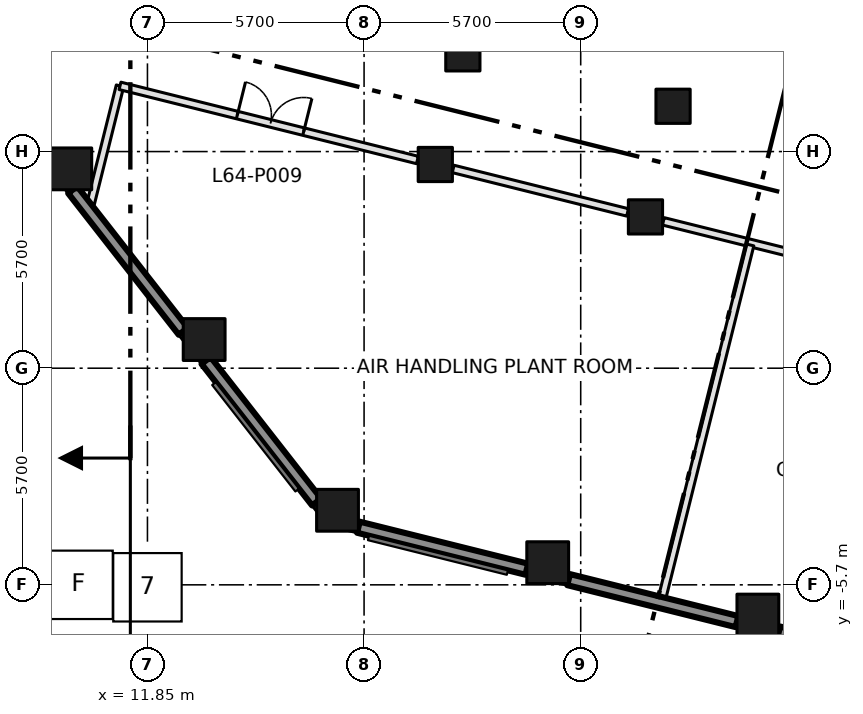
"""IFC4 building model, lengths in metres.
Left out: names, types, materials, properties, quantities, classifications, styles, units other than length and angle.
Written with IfcOpenShell. Run it as: python <this file> out.ifc"""

import sys

from ifc_helpers import new_model, si_unit, direction, frame, frame_2d, origin, origin_2d, place, context, subcontext, project, spatial, rectangle, extrude, element, fill, save


model = new_model("IFC4")
c1 = context("Model", 3, precision=1e-05, world=origin(), true_north=direction((0.0, 1.0)))
c2 = subcontext(c1, "Body", "Model", "MODEL_VIEW")
j1 = project(units=[si_unit("LENGTHUNIT", "METRE"), si_unit("PLANEANGLEUNIT", "RADIAN")], contexts=[c1])
p1 = place(None, origin())
s1 = spatial("IfcSite", under=j1, at=p1, CompositionType="ELEMENT")
p2 = place(p1, origin())
s2 = spatial("IfcBuilding", under=s1, at=p2, CompositionType="ELEMENT")
p3 = place(p2, frame((0.0, 0.0, 280.2)))
s3 = spatial("IfcBuildingStorey", under=s2, at=p3, CompositionType="ELEMENT", Elevation=280.2)
for number, where, z_axis, x_axis in (
    (1, (16.851, -3.738, 0.0), (0.0, 0.0, 1.0), (1.0, 0.0, 0.0)),
    (2, (13.342, 0.754, 0.0), (0.0, 0.0, 1.0), (1.0, 0.0, 0.0)),
    (3, (9.833, 5.245, 0.0), (0.0, 0.0, 1.0), (1.0, 0.0, 0.0)),
    (4, (22.382, -5.117, 0.0), (0.0, 0.0, 1.0), (1.0, 0.0, 0.0)),
    (5, (27.912, -6.496, 0.0), (0.0, 0.0, 1.0), (1.0, 0.0, 0.0)),
):
    element("IfcColumn", number, at=place(p3, frame(where, z_axis=z_axis, x_axis=x_axis)), inside=s3, PredefinedType="COLUMN", context=c2, shape_type="SweptSolid", body=[
        extrude(rectangle(XDim=1.1, YDim=1.1, at=origin_2d()), origin(), (0.0, 0.0, 1.0), 4.2),
    ])
for number, where, z_axis, x_axis in (
    (6, (19.424, 5.36, 0.0), (0.0, 0.0, 1.0), (1.0, 0.0, 0.0)),
    (7, (24.954, 3.981, 0.0), (0.0, 0.0, 1.0), (1.0, 0.0, 0.0)),
    (8, (20.149, 8.271, 0.0), (0.0, 0.0, 1.0), (1.0, 0.0, 0.0)),
    (9, (25.68, 6.892, 0.0), (0.0, 0.0, 1.0), (1.0, 0.0, 0.0)),
):
    element("IfcColumn", number, at=place(p3, frame(where, z_axis=z_axis, x_axis=x_axis)), inside=s3, PredefinedType="COLUMN", context=c2, shape_type="SweptSolid", body=[
        extrude(rectangle(XDim=0.9, YDim=0.9, at=origin_2d()), origin(), (0.0, 0.0, 1.0), 4.2),
    ])
p4 = place(p3, frame((10.356, 4.332, 0.0), z_axis=(0.0, 0.0, 1.0), x_axis=(0.241869632235, 0.970308755501, 0.0)))
e10 = element("IfcWall", 10, at=p4, inside=s3, PredefinedType="PARTITIONING", context=c2, shape_type="SweptSolid", body=[
    extrude(rectangle(XDim=3.192, YDim=0.2, at=frame_2d((1.596, 0.0))), origin(), (0.0, 0.0, 1.0), 3.75),
])
p5 = place(p3, frame((11.128, 7.429, 0.0), z_axis=(0.0, 0.0, 1.0), x_axis=(0.970306088087, -0.241880332852, 0.0)))
e11 = element("IfcWall", 11, at=p5, inside=s3, PredefinedType="PARTITIONING", context=c2, shape_type="SweptSolid", body=[
    extrude(rectangle(XDim=8.066, YDim=0.2, at=frame_2d((4.033, 0.0))), origin(), (0.0, 0.0, 1.0), 3.75),
])
p6 = place(p5, frame((3.18, 0.0, 0.0)))
e12 = element("IfcOpeningElement", 12, at=p6, cuts=e11, PredefinedType="OPENING", context=c2, shape_type="SweptSolid", body=[
    extrude(rectangle(XDim=1.8, YDim=2.1, at=frame_2d((0.9, 1.05))), frame((0.0, 0.11, 0.0), z_axis=(0.0, -1.0, 0.0), x_axis=(1.0, 0.0, 0.0)), (0.0, 0.0, 1.0), 0.22),
])
p7 = place(p3, frame((19.894, 5.243, 0.0), z_axis=(0.0, 0.0, 1.0), x_axis=(0.970324390034, -0.241806902517, 0.0)))
e13 = element("IfcWall", 13, at=p7, inside=s3, PredefinedType="PARTITIONING", context=c2, shape_type="SweptSolid", body=[
    extrude(rectangle(XDim=4.73, YDim=0.2, at=frame_2d((2.365, 0.0))), origin(), (0.0, 0.0, 1.0), 3.75),
])
p8 = place(p3, frame((25.424, 3.864, 0.0), z_axis=(0.0, 0.0, 1.0), x_axis=(0.970324351393, -0.241807057574, 0.0)))
e14 = element("IfcWall", 14, at=p8, inside=s3, PredefinedType="PARTITIONING", context=c2, shape_type="SweptSolid", body=[
    extrude(rectangle(XDim=4.731, YDim=0.2, at=frame_2d((2.366, 0.0))), origin(), (0.0, 0.0, 1.0), 3.75),
])
p9 = place(p3, frame((25.397, -6.023, 0.0), z_axis=(0.0, 0.0, 1.0), x_axis=(0.242000222655, 0.97027619379, 0.0)))
e15 = element("IfcWall", 15, at=p9, inside=s3, PredefinedType="PARTITIONING", context=c2, shape_type="SweptSolid", body=[
    extrude(rectangle(XDim=9.55, YDim=0.2, at=frame_2d((4.775, 0.0))), origin(), (0.0, 0.0, 1.0), 3.75),
])
p10 = place(p3, frame((6.373, 9.187, 0.0), z_axis=(0.0, 0.0, 1.0), x_axis=(0.615601945293, -0.788057259945, 0.0)))
e16 = element("IfcWall", 16, at=p10, inside=s3, PredefinedType="SOLIDWALL", context=c2, shape_type="SweptSolid", body=[
    extrude(rectangle(XDim=4.727, YDim=0.3, at=frame_2d((2.364, 0.0))), origin(), (0.0, 0.0, 1.0), 3.0),
])
for number, where, z_axis, x_axis in (
    (17, (9.882, 4.695, 0.0), (0.0, 0.0, 1.0), (0.616, -0.788, 0.0)),
    (18, (13.391, 0.204, 0.0), (0.0, 0.0, 1.0), (0.616, -0.788, 0.0)),
):
    element("IfcWall", number, at=place(p3, frame(where, z_axis=z_axis, x_axis=x_axis)), inside=s3, PredefinedType="SOLIDWALL", context=c2, shape_type="SweptSolid", body=[
        extrude(rectangle(XDim=4.726, YDim=0.3, at=frame_2d((2.363, 0.0))), origin(), (0.0, 0.0, 1.0), 3.0),
    ])
p11 = place(p3, frame((17.401, -4.184, 0.0), z_axis=(0.0, 0.0, 1.0), x_axis=(0.970286982272, -0.241956963183, 0.0)))
e19 = element("IfcWall", 19, at=p11, inside=s3, PredefinedType="SOLIDWALL", context=c2, shape_type="SweptSolid", body=[
    extrude(rectangle(XDim=4.567, YDim=0.3, at=frame_2d((2.283, 0.0))), origin(), (0.0, 0.0, 1.0), 3.0),
])
p12 = place(p3, frame((22.932, -5.563, 0.0), z_axis=(0.0, 0.0, 1.0), x_axis=(0.970324663654, -0.241805804532, 0.0)))
e20 = element("IfcWall", 20, at=p12, inside=s3, PredefinedType="SOLIDWALL", context=c2, shape_type="SweptSolid", body=[
    extrude(rectangle(XDim=4.566, YDim=0.3, at=frame_2d((2.283, 0.0))), origin(), (0.0, 0.0, 1.0), 3.0),
])
p13 = place(p3, frame((28.462, -6.942, 0.0), z_axis=(0.0, 0.0, 1.0), x_axis=(0.970337166083, -0.241755628927, 0.0)))
e21 = element("IfcWall", 21, at=p13, inside=s3, PredefinedType="SOLIDWALL", context=c2, shape_type="SweptSolid", body=[
    extrude(rectangle(XDim=4.567, YDim=0.3, at=frame_2d((2.283, 0.0))), origin(), (0.0, 0.0, 1.0), 3.0),
])
p14 = place(p6, origin())
e22 = element("IfcDoor", 22, at=p14, inside=s3, OperationType="DOUBLE_DOOR_SINGLE_SWING", PredefinedType="DOOR", context=c2, shape_type="SweptSolid", body=[
    extrude(rectangle(XDim=1.8, YDim=2.1, at=frame_2d((0.9, 1.05))), frame((0.0, 0.025, 0.0), z_axis=(0.0, -1.0, 0.0), x_axis=(1.0, 0.0, 0.0)), (0.0, 0.0, 1.0), 0.05),
])
fill(e12, e22)
save(model, sys.argv[1])
